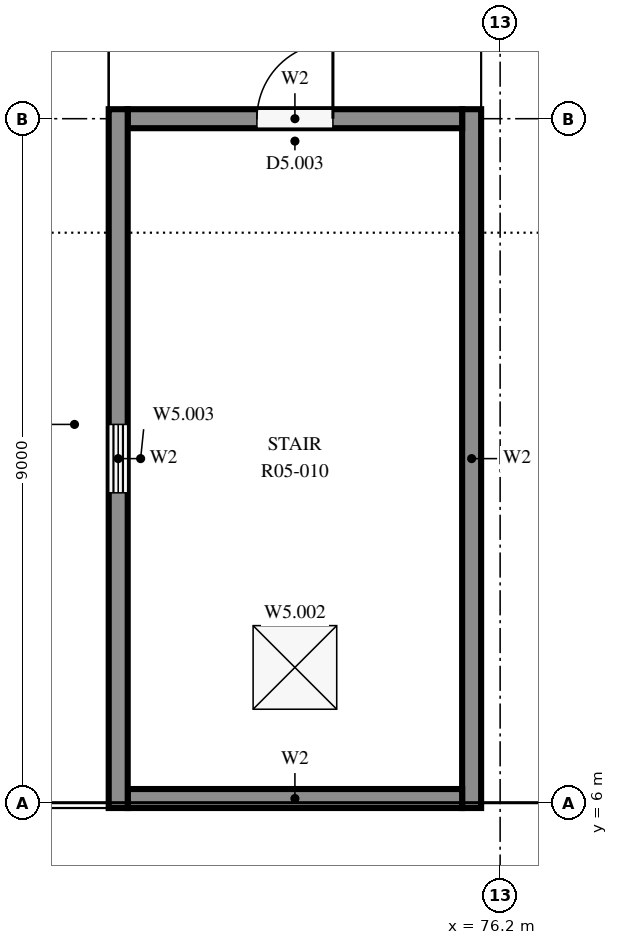
"""IFC4 building model, lengths in metres.
Left out: names, types, materials, properties, quantities, classifications, styles, units other than length and angle.
Written with IfcOpenShell. Run it as: python <this file> out.ifc"""

import sys

from ifc_helpers import new_model, si_unit, direction, frame, frame_2d, origin, origin_2d, place, context, subcontext, project, spatial, rectangle, extrude, element, fill, save


model = new_model("IFC4")
c1 = context("Model", 3, precision=1e-05, world=origin(), true_north=direction((0.0, 1.0)))
c2 = subcontext(c1, "Body", "Model", "MODEL_VIEW")
j1 = project(units=[si_unit("LENGTHUNIT", "METRE"), si_unit("PLANEANGLEUNIT", "RADIAN")], contexts=[c1])
p1 = place(None, origin())
s1 = spatial("IfcSite", under=j1, at=p1, CompositionType="ELEMENT")
p2 = place(p1, origin())
s2 = spatial("IfcBuilding", under=s1, at=p2, CompositionType="ELEMENT")
p3 = place(p2, frame((0.0, 0.0, 18.9)))
s3 = spatial("IfcBuildingStorey", under=s2, at=p3, CompositionType="ELEMENT", Elevation=18.9)
p4 = place(p3, frame((71.175, 5.93, 0.0), z_axis=(0.0, 0.0, 1.0), x_axis=(0.0, 1.0, 0.0)))
e1 = element("IfcWall", 1, at=p4, inside=s3, PredefinedType="SOLIDWALL", context=c2, shape_type="SweptSolid", body=[
    extrude(rectangle(XDim=9.195, YDim=0.25, at=frame_2d((4.598, 0.0))), origin(), (0.0, 0.0, 1.0), 2.45),
])
p5 = place(p4, frame((4.147, 0.0, 0.9)))
e2 = element("IfcOpeningElement", 2, at=p5, cuts=e1, PredefinedType="OPENING", context=c2, shape_type="SweptSolid", body=[
    extrude(rectangle(XDim=0.9, YDim=1.2, at=frame_2d((0.45, 0.6))), frame((0.0, 0.135, 0.0), z_axis=(0.0, -1.0, 0.0), x_axis=(1.0, 0.0, 0.0)), (0.0, 0.0, 1.0), 0.27),
])
p6 = place(p3, frame((75.825, 5.93, 0.0), z_axis=(0.0, 0.0, 1.0), x_axis=(0.0, 1.0, 0.0)))
e3 = element("IfcWall", 3, at=p6, inside=s3, PredefinedType="SOLIDWALL", context=c2, shape_type="SweptSolid", body=[
    extrude(rectangle(XDim=9.195, YDim=0.25, at=frame_2d((4.598, 0.0))), origin(), (0.0, 0.0, 1.0), 2.45),
])
p7 = place(p3, frame((71.3, 6.055, 0.0), z_axis=(0.0, 0.0, 1.0), x_axis=(1.0, 0.0, 0.0)))
e4 = element("IfcWall", 4, at=p7, inside=s3, PredefinedType="SOLIDWALL", context=c2, shape_type="SweptSolid", body=[
    extrude(rectangle(XDim=4.4, YDim=0.25, at=frame_2d((2.2, 0.0))), origin(), (0.0, 0.0, 1.0), 2.45),
])
p8 = place(p3, frame((71.3, 15.0, 0.0), z_axis=(0.0, 0.0, 1.0), x_axis=(1.0, 0.0, 0.0)))
e5 = element("IfcWall", 5, at=p8, inside=s3, PredefinedType="SOLIDWALL", context=c2, shape_type="SweptSolid", body=[
    extrude(rectangle(XDim=4.4, YDim=0.25, at=frame_2d((2.2, 0.0))), origin(), (0.0, 0.0, 1.0), 2.45),
])
p9 = place(p8, frame((1.7, 0.0, 0.0)))
e6 = element("IfcOpeningElement", 6, at=p9, cuts=e5, PredefinedType="OPENING", context=c2, shape_type="SweptSolid", body=[
    extrude(rectangle(XDim=1.0, YDim=2.1, at=frame_2d((0.5, 1.05))), frame((0.0, 0.135, 0.0), z_axis=(0.0, -1.0, 0.0), x_axis=(1.0, 0.0, 0.0)), (0.0, 0.0, 1.0), 0.27),
])
p10 = place(p3, frame((0.0, 0.0, 2.45)))
p11 = place(p10, frame((73.5, 7.78, 0.0)))
p12 = place(p11, frame((0.0, 0.0, 0.15)))
e7 = element("IfcWindow", 7, at=p12, inside=s3, PartitioningType="SINGLE_PANEL", PredefinedType="SKYLIGHT", context=c2, shape_type="SweptSolid", body=[
    extrude(rectangle(XDim=1.1, YDim=1.1, at=origin_2d()), origin(), (0.0, 0.0, 1.0), 0.05),
])
p13 = place(p9, origin())
e8 = element("IfcDoor", 8, at=p13, inside=s3, OperationType="SINGLE_SWING_RIGHT", PredefinedType="DOOR", context=c2, shape_type="SweptSolid", body=[
    extrude(rectangle(XDim=1.0, YDim=2.1, at=frame_2d((0.5, 1.05))), frame((0.0, 0.025, 0.0), z_axis=(0.0, -1.0, 0.0), x_axis=(1.0, 0.0, 0.0)), (0.0, 0.0, 1.0), 0.05),
])
fill(e6, e8)
p14 = place(p5, origin())
e9 = element("IfcWindow", 9, at=p14, inside=s3, PartitioningType="SINGLE_PANEL", PredefinedType="WINDOW", context=c2, shape_type="SweptSolid", body=[
    extrude(rectangle(XDim=0.9, YDim=1.2, at=frame_2d((0.45, 0.6))), frame((0.0, 0.03, 0.0), z_axis=(0.0, -1.0, 0.0), x_axis=(1.0, 0.0, 0.0)), (0.0, 0.0, 1.0), 0.06),
])
fill(e2, e9)
save(model, sys.argv[1])
